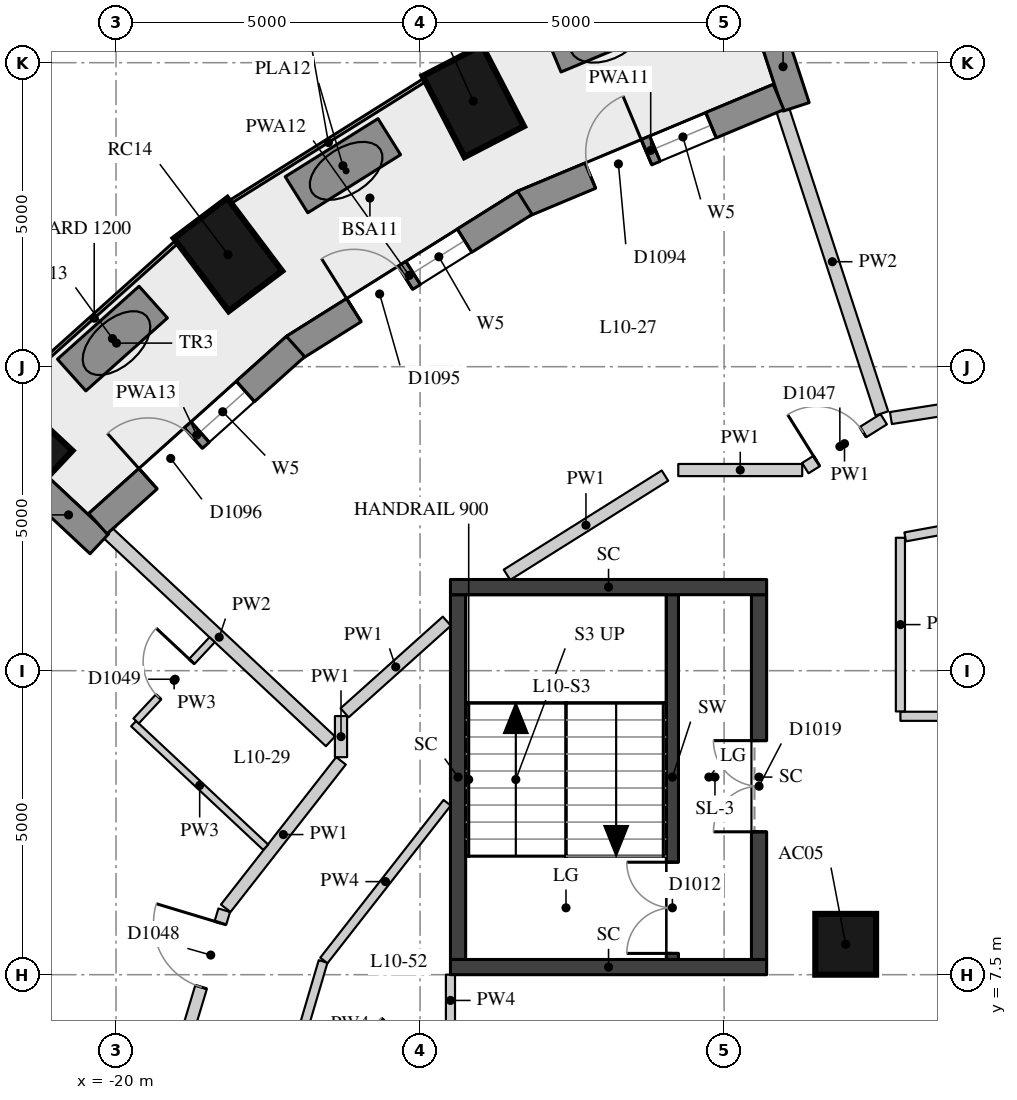
"""IFC4 building model, lengths in metres.
Left out: names, types, materials, properties, quantities, classifications, styles, units other than length and angle.
Written with IfcOpenShell. Run it as: python <this file> out.ifc"""

import sys

from ifc_helpers import new_model, si_unit, direction, frame, frame_2d, origin, origin_2d, place, context, subcontext, project, spatial, rectangle, extrude, element, fill, save


model = new_model("IFC4")
c1 = context("Model", 3, precision=1e-05, world=origin(), true_north=direction((0.0, 1.0)))
c2 = subcontext(c1, "Body", "Model", "MODEL_VIEW")
j1 = project(units=[si_unit("LENGTHUNIT", "METRE"), si_unit("PLANEANGLEUNIT", "RADIAN")], contexts=[c1])
p1 = place(None, origin())
s1 = spatial("IfcSite", under=j1, at=p1, CompositionType="ELEMENT")
p2 = place(p1, origin())
s2 = spatial("IfcBuilding", under=s1, at=p2, CompositionType="ELEMENT")
p3 = place(p2, frame((0.0, 0.0, 41.5)))
s3 = spatial("IfcBuildingStorey", under=s2, at=p3, CompositionType="ELEMENT", Elevation=41.5)
for number, where, z_axis, x_axis in (
    (1, (-14.125, 21.867, 0.0), (0.0, 0.0, 1.0), (-0.46, 0.888, 0.0)),
    (2, (-18.159, 19.343, 0.0), (0.0, 0.0, 1.0), (-0.601, 0.799, 0.0)),
    (3, (-21.641, 16.23, 0.0), (0.0, 0.0, 1.0), (-0.73, 0.683, 0.0)),
):
    element("IfcColumn", number, at=place(p3, frame(where, z_axis=z_axis, x_axis=x_axis)), inside=s3, PredefinedType="COLUMN", context=c2, shape_type="SweptSolid", body=[
        extrude(rectangle(XDim=1.5, YDim=1.1, at=origin_2d()), origin(), (0.0, 0.0, 1.0), 3.3),
    ])
p4 = place(p3, frame((-8.0, 8.0, 0.0), z_axis=(0.0, 0.0, 1.0), x_axis=(1.0, 0.0, 0.0)))
e4 = element("IfcColumn", 4, at=p4, inside=s3, PredefinedType="COLUMN", context=c2, shape_type="SweptSolid", body=[
    extrude(rectangle(XDim=1.0, YDim=1.0, at=origin_2d()), origin(), (0.0, 0.0, 1.0), 3.3),
])
p5 = place(p3, frame((-9.246, 23.095, 0.0), z_axis=(0.0, 0.0, 1.0), x_axis=(0.310110311429, -0.950700581017, 0.0)))
e5 = element("IfcWall", 5, at=p5, inside=s3, PredefinedType="SOLIDWALL", context=c2, shape_type="SweptSolid", body=[
    extrude(rectangle(XDim=1.39, YDim=0.45, at=frame_2d((0.695, 0.0))), origin(), (0.0, 0.0, 1.0), 3.02),
])
p6 = place(p3, frame((-21.289, 15.538, 0.0), z_axis=(0.0, 0.0, 1.0), x_axis=(0.730149942784, -0.683286953668, 0.0)))
e6 = element("IfcWall", 6, at=p6, inside=s3, PredefinedType="SOLIDWALL", context=c2, shape_type="SweptSolid", body=[
    extrude(rectangle(XDim=1.391, YDim=0.45, at=frame_2d((0.695, 0.0))), origin(), (0.0, 0.0, 1.0), 3.02),
])
p7 = place(p3, frame((-9.104, 21.936, 0.0), z_axis=(0.0, 0.0, 1.0), x_axis=(-0.922645368502, -0.385649483317, 0.0)))
e7 = element("IfcWall", 7, at=p7, inside=s3, PredefinedType="SOLIDWALL", context=c2, shape_type="SweptSolid", body=[
    extrude(rectangle(XDim=4.559, YDim=0.45, at=frame_2d((2.279, 0.0))), origin(), (0.0, 0.0, 1.0), 3.02),
])
p8 = place(p7, frame((1.204, 0.0, 0.4)))
e8 = element("IfcOpeningElement", 8, at=p8, cuts=e7, PredefinedType="OPENING", context=c2, shape_type="SweptSolid", body=[
    extrude(rectangle(XDim=1.0, YDim=1.75, at=frame_2d((0.5, 0.875))), frame((0.0, 0.235, 0.0), z_axis=(0.0, -1.0, 0.0), x_axis=(1.0, 0.0, 0.0)), (0.0, 0.0, 1.0), 0.47),
])
p9 = place(p7, frame((2.354, 0.0, 0.0)))
e9 = element("IfcOpeningElement", 9, at=p9, cuts=e7, PredefinedType="OPENING", context=c2, shape_type="SweptSolid", body=[
    extrude(rectangle(XDim=1.0, YDim=2.15, at=frame_2d((0.5, 1.075))), frame((0.0, 0.235, 0.0), z_axis=(0.0, -1.0, 0.0), x_axis=(1.0, 0.0, 0.0)), (0.0, 0.0, 1.0), 0.47),
])
p10 = place(p3, frame((-13.277, 20.195, 0.0), z_axis=(0.0, 0.0, 1.0), x_axis=(-0.846976005863, -0.531631117874, 0.0)))
e10 = element("IfcWall", 10, at=p10, inside=s3, PredefinedType="SOLIDWALL", context=c2, shape_type="SweptSolid", body=[
    extrude(rectangle(XDim=4.488, YDim=0.45, at=frame_2d((2.244, 0.0))), origin(), (0.0, 0.0, 1.0), 3.02),
])
p11 = place(p10, frame((1.169, 0.0, 0.4)))
e11 = element("IfcOpeningElement", 11, at=p11, cuts=e10, PredefinedType="OPENING", context=c2, shape_type="SweptSolid", body=[
    extrude(rectangle(XDim=1.0, YDim=1.75, at=frame_2d((0.5, 0.875))), frame((0.0, 0.235, 0.0), z_axis=(0.0, -1.0, 0.0), x_axis=(1.0, 0.0, 0.0)), (0.0, 0.0, 1.0), 0.47),
])
p12 = place(p10, frame((2.319, 0.0, 0.0)))
e12 = element("IfcOpeningElement", 12, at=p12, cuts=e10, PredefinedType="OPENING", context=c2, shape_type="SweptSolid", body=[
    extrude(rectangle(XDim=1.0, YDim=2.15, at=frame_2d((0.5, 1.075))), frame((0.0, 0.235, 0.0), z_axis=(0.0, -1.0, 0.0), x_axis=(1.0, 0.0, 0.0)), (0.0, 0.0, 1.0), 0.47),
])
p13 = place(p3, frame((-17.048, 17.832, 0.0), z_axis=(0.0, 0.0, 1.0), x_axis=(-0.744619286768, -0.667489413978, 0.0)))
e13 = element("IfcWall", 13, at=p13, inside=s3, PredefinedType="SOLIDWALL", context=c2, shape_type="SweptSolid", body=[
    extrude(rectangle(XDim=4.365, YDim=0.45, at=frame_2d((2.183, 0.0))), origin(), (0.0, 0.0, 1.0), 3.02),
])
p14 = place(p13, frame((1.107, 0.0, 0.4)))
e14 = element("IfcOpeningElement", 14, at=p14, cuts=e13, PredefinedType="OPENING", context=c2, shape_type="SweptSolid", body=[
    extrude(rectangle(XDim=1.0, YDim=1.75, at=frame_2d((0.5, 0.875))), frame((0.0, 0.235, 0.0), z_axis=(0.0, -1.0, 0.0), x_axis=(1.0, 0.0, 0.0)), (0.0, 0.0, 1.0), 0.47),
])
p15 = place(p13, frame((2.258, 0.0, 0.0)))
e15 = element("IfcOpeningElement", 15, at=p15, cuts=e13, PredefinedType="OPENING", context=c2, shape_type="SweptSolid", body=[
    extrude(rectangle(XDim=1.0, YDim=2.15, at=frame_2d((0.5, 1.075))), frame((0.0, 0.235, 0.0), z_axis=(0.0, -1.0, 0.0), x_axis=(1.0, 0.0, 0.0)), (0.0, 0.0, 1.0), 0.47),
])
p16 = place(p3, frame((-11.155, 23.362, 0.0), z_axis=(0.0, 0.0, 1.0), x_axis=(-0.923000660042, -0.384798364811, 0.0)))
e16 = element("IfcWall", 16, at=p16, inside=s3, PredefinedType="USERDEFINED", context=c2, shape_type="SweptSolid", body=[
    extrude(rectangle(XDim=1.8, YDim=0.7, at=frame_2d((0.9, 0.0))), origin(), (0.0, 0.0, 1.0), 0.75),
])
p17 = place(p3, frame((-15.506, 21.283, 0.0), z_axis=(0.0, 0.0, 1.0), x_axis=(-0.847609446823, -0.530620604252, 0.0)))
e17 = element("IfcWall", 17, at=p17, inside=s3, PredefinedType="USERDEFINED", context=c2, shape_type="SweptSolid", body=[
    extrude(rectangle(XDim=1.8, YDim=0.7, at=frame_2d((0.9, 0.0))), origin(), (0.0, 0.0, 1.0), 0.75),
])
p18 = place(p3, frame((-19.388, 18.562, 0.0), z_axis=(0.0, 0.0, 1.0), x_axis=(-0.745535653445, -0.666465745139, 0.0)))
e18 = element("IfcWall", 18, at=p18, inside=s3, PredefinedType="USERDEFINED", context=c2, shape_type="SweptSolid", body=[
    extrude(rectangle(XDim=1.8, YDim=0.7, at=frame_2d((0.9, 0.0))), origin(), (0.0, 0.0, 1.0), 0.75),
])
p19 = place(p3, frame((-10.85, 7.75, 0.0), z_axis=(0.0, 0.0, 1.0), x_axis=(0.0, 1.0, 0.0)))
e19 = element("IfcWall", 19, at=p19, inside=s3, PredefinedType="SHEAR", context=c2, shape_type="SweptSolid", body=[
    extrude(rectangle(XDim=6.0, YDim=0.2, at=frame_2d((3.0, 0.0))), origin(), (0.0, 0.0, 1.0), 3.02),
])
p20 = place(p19, frame((0.1, 0.0, 0.0)))
e20 = element("IfcOpeningElement", 20, at=p20, cuts=e19, PredefinedType="OPENING", context=c2, shape_type="SweptSolid", body=[
    extrude(rectangle(XDim=1.5, YDim=2.1, at=frame_2d((0.75, 1.05))), frame((0.0, 0.11, 0.0), z_axis=(0.0, -1.0, 0.0), x_axis=(1.0, 0.0, 0.0)), (0.0, 0.0, 1.0), 0.22),
])
p21 = place(p3, frame((-14.375, 7.75, -0.28), z_axis=(0.0, 0.0, 1.0), x_axis=(0.0, 1.0, 0.0)))
e21 = element("IfcWall", 21, at=p21, inside=s3, PredefinedType="SHEAR", context=c2, shape_type="SweptSolid", body=[
    extrude(rectangle(XDim=6.0, YDim=0.25, at=frame_2d((3.0, 0.0))), origin(), (0.0, 0.0, 1.0), 3.3),
])
p22 = place(p3, frame((-9.425, 7.75, -0.28), z_axis=(0.0, 0.0, 1.0), x_axis=(0.0, 1.0, 0.0)))
e22 = element("IfcWall", 22, at=p22, inside=s3, PredefinedType="SHEAR", context=c2, shape_type="SweptSolid", body=[
    extrude(rectangle(XDim=6.0, YDim=0.25, at=frame_2d((3.0, 0.0))), origin(), (0.0, 0.0, 1.0), 3.3),
])
p23 = place(p22, frame((2.1, 0.0, 0.28)))
e23 = element("IfcOpeningElement", 23, at=p23, cuts=e22, PredefinedType="OPENING", context=c2, shape_type="SweptSolid", body=[
    extrude(rectangle(XDim=1.5, YDim=2.1, at=frame_2d((0.75, 1.05))), frame((0.0, 0.135, 0.0), z_axis=(0.0, -1.0, 0.0), x_axis=(1.0, 0.0, 0.0)), (0.0, 0.0, 1.0), 0.27),
])
for number, where, z_axis, x_axis in (
    (24, (-14.5, 13.875, -0.28), (0.0, 0.0, 1.0), (1.0, 0.0, 0.0)),
    (25, (-14.5, 7.625, -0.28), (0.0, 0.0, 1.0), (1.0, 0.0, 0.0)),
):
    element("IfcWall", number, at=place(p3, frame(where, z_axis=z_axis, x_axis=x_axis)), inside=s3, PredefinedType="SHEAR", context=c2, shape_type="SweptSolid", body=[
        extrude(rectangle(XDim=5.2, YDim=0.25, at=frame_2d((2.6, 0.0))), origin(), (0.0, 0.0, 1.0), 3.3),
    ])
p24 = place(p3, frame((-20.771, 0.095, 0.0), z_axis=(0.0, 0.0, 1.0), x_axis=(0.288464952331, 0.957490454927, 0.0)))
e26 = element("IfcWall", 26, at=p24, inside=s3, PredefinedType="PARTITIONING", context=c2, shape_type="SweptSolid", body=[
    extrude(rectangle(XDim=8.841, YDim=0.2, at=frame_2d((4.42, 0.0))), origin(), (0.0, 0.0, 1.0), 3.02),
])
p25 = place(p24, frame((7.521, 0.0, 0.0)))
e27 = element("IfcOpeningElement", 27, at=p25, cuts=e26, PredefinedType="OPENING", context=c2, shape_type="SweptSolid", body=[
    extrude(rectangle(XDim=1.1, YDim=2.1, at=frame_2d((0.55, 1.05))), frame((0.0, 0.11, 0.0), z_axis=(0.0, -1.0, 0.0), x_axis=(1.0, 0.0, 0.0)), (0.0, 0.0, 1.0), 0.22),
])
p26 = place(p24, frame((0.877, 0.0, 0.0)))
e28 = element("IfcOpeningElement", 28, at=p26, cuts=e26, PredefinedType="OPENING", context=c2, shape_type="SweptSolid", body=[
    extrude(rectangle(XDim=0.9, YDim=2.1, at=frame_2d((0.45, 1.05))), frame((0.0, 0.11, 0.0), z_axis=(0.0, -1.0, 0.0), x_axis=(1.0, 0.0, 0.0)), (0.0, 0.0, 1.0), 0.22),
])
p27 = place(p3, frame((-18.196, 8.592, 0.0), z_axis=(0.0, 0.0, 1.0), x_axis=(0.615854849191, 0.787859635168, 0.0)))
e29 = element("IfcWall", 29, at=p27, inside=s3, PredefinedType="PARTITIONING", context=c2, shape_type="SweptSolid", body=[
    extrude(rectangle(XDim=3.079, YDim=0.2, at=frame_2d((1.539, 0.0))), origin(), (0.0, 0.0, 1.0), 3.02),
])
p28 = place(p3, frame((-16.3, 11.078, 0.0), z_axis=(0.0, 0.0, 1.0), x_axis=(0.0, 1.0, 0.0)))
e30 = element("IfcWall", 30, at=p28, inside=s3, PredefinedType="PARTITIONING", context=c2, shape_type="SweptSolid", body=[
    extrude(rectangle(XDim=0.676, YDim=0.2, at=frame_2d((0.338, 0.0))), origin(), (0.0, 0.0, 1.0), 3.02),
])
p29 = place(p3, frame((-16.24, 11.807, 0.0), z_axis=(0.0, 0.0, 1.0), x_axis=(0.744658399013, 0.667445779655, 0.0)))
e31 = element("IfcWall", 31, at=p29, inside=s3, PredefinedType="PARTITIONING", context=c2, shape_type="SweptSolid", body=[
    extrude(rectangle(XDim=2.258, YDim=0.2, at=frame_2d((1.129, 0.0))), origin(), (0.0, 0.0, 1.0), 3.02),
])
p30 = place(p3, frame((-13.571, 14.077, 0.0), z_axis=(0.0, 0.0, 1.0), x_axis=(0.846954991261, 0.53166459613, 0.0)))
e32 = element("IfcWall", 32, at=p30, inside=s3, PredefinedType="PARTITIONING", context=c2, shape_type="SweptSolid", body=[
    extrude(rectangle(XDim=3.068, YDim=0.2, at=frame_2d((1.534, 0.0))), origin(), (0.0, 0.0, 1.0), 3.02),
])
p31 = place(p3, frame((-10.753, 15.8, 0.0), z_axis=(0.0, 0.0, 1.0), x_axis=(1.0, 0.0, 0.0)))
e33 = element("IfcWall", 33, at=p31, inside=s3, PredefinedType="PARTITIONING", context=c2, shape_type="SweptSolid", body=[
    extrude(rectangle(XDim=2.039, YDim=0.2, at=frame_2d((1.019, 0.0))), origin(), (0.0, 0.0, 1.0), 3.02),
])
p32 = place(p3, frame((-8.664, 15.832, 0.0), z_axis=(0.0, 0.0, 1.0), x_axis=(0.848304931689, 0.529508019648, 0.0)))
e34 = element("IfcWall", 34, at=p32, inside=s3, PredefinedType="PARTITIONING", context=c2, shape_type="SweptSolid", body=[
    extrude(rectangle(XDim=1.52, YDim=0.2, at=frame_2d((0.76, 0.0))), origin(), (0.0, 0.0, 1.0), 3.02),
])
p33 = place(p32, frame((0.22, 0.0, 0.0)))
e35 = element("IfcOpeningElement", 35, at=p33, cuts=e34, PredefinedType="OPENING", context=c2, shape_type="SweptSolid", body=[
    extrude(rectangle(XDim=0.9, YDim=2.1, at=frame_2d((0.45, 1.05))), frame((0.0, 0.11, 0.0), z_axis=(0.0, -1.0, 0.0), x_axis=(1.0, 0.0, 0.0)), (0.0, 0.0, 1.0), 0.22),
])
p34 = place(p3, frame((-7.256, 16.656, 0.0), z_axis=(0.0, 0.0, 1.0), x_axis=(0.987787475409, 0.15580726371, 0.0)))
e36 = element("IfcWall", 36, at=p34, inside=s3, PredefinedType="PARTITIONING", context=c2, shape_type="SweptSolid", body=[
    extrude(rectangle(XDim=7.346, YDim=0.2, at=frame_2d((3.673, 0.0))), origin(), (0.0, 0.0, 1.0), 3.02),
])
p35 = place(p34, frame((3.86, 0.0, 0.0)))
e37 = element("IfcOpeningElement", 37, at=p35, cuts=e36, PredefinedType="OPENING", context=c2, shape_type="SweptSolid", body=[
    extrude(rectangle(XDim=1.1, YDim=2.1, at=frame_2d((0.55, 1.05))), frame((0.0, 0.11, 0.0), z_axis=(0.0, -1.0, 0.0), x_axis=(1.0, 0.0, 0.0)), (0.0, 0.0, 1.0), 0.22),
])
p36 = place(p3, frame((-4.58, 11.75, 0.0), z_axis=(0.0, 0.0, 1.0), x_axis=(-1.0, 0.0, 0.0)))
e38 = element("IfcWall", 38, at=p36, inside=s3, PredefinedType="PARTITIONING", context=c2, shape_type="SweptSolid", body=[
    extrude(rectangle(XDim=2.52, YDim=0.15, at=frame_2d((1.26, 0.0))), origin(), (0.0, 0.0, 1.0), 3.02),
])
p37 = place(p3, frame((-7.1, 11.83, 0.0), z_axis=(0.0, 0.0, 1.0), x_axis=(0.0, 1.0, 0.0)))
e39 = element("IfcWall", 39, at=p37, inside=s3, PredefinedType="PARTITIONING", context=c2, shape_type="SweptSolid", body=[
    extrude(rectangle(XDim=2.856, YDim=0.15, at=frame_2d((1.428, 0.0))), origin(), (0.0, 0.0, 1.0), 3.02),
])
p38 = place(p3, frame((-7.021, 14.701, 0.0), z_axis=(0.0, 0.0, 1.0), x_axis=(0.983567630435, 0.180540068573, 0.0)))
e40 = element("IfcWall", 40, at=p38, inside=s3, PredefinedType="PARTITIONING", context=c2, shape_type="SweptSolid", body=[
    extrude(rectangle(XDim=6.66, YDim=0.15, at=frame_2d((3.33, 0.0))), origin(), (0.0, 0.0, 1.0), 2.57),
])
p39 = place(p3, frame((-14.5, 7.501, 0.0), z_axis=(0.0, 0.0, 1.0), x_axis=(0.0, -1.0, 0.0)))
e41 = element("IfcWall", 41, at=p39, inside=s3, PredefinedType="PARTITIONING", context=c2, shape_type="SweptSolid", body=[
    extrude(rectangle(XDim=0.849, YDim=0.15, at=frame_2d((0.424, 0.0))), origin(), (0.0, 0.0, 1.0), 3.02),
])
p40 = place(p3, frame((-17.206, 5.645, 0.0), z_axis=(0.0, 0.0, 1.0), x_axis=(0.282930600638, 0.95914038348, 0.0)))
e42 = element("IfcWall", 42, at=p40, inside=s3, PredefinedType="PARTITIONING", context=c2, shape_type="SweptSolid", body=[
    extrude(rectangle(XDim=2.162, YDim=0.15, at=frame_2d((1.081, 0.0))), origin(), (0.0, 0.0, 1.0), 3.02),
])
p41 = place(p3, frame((-16.582, 7.734, 0.0), z_axis=(0.0, 0.0, 1.0), x_axis=(0.615848335932, 0.787864726416, 0.0)))
e43 = element("IfcWall", 43, at=p41, inside=s3, PredefinedType="PARTITIONING", context=c2, shape_type="SweptSolid", body=[
    extrude(rectangle(XDim=3.293, YDim=0.15, at=frame_2d((1.646, 0.0))), origin(), (0.0, 0.0, 1.0), 3.02),
])
p42 = place(p3, frame((-9.034, 21.721, 0.0), z_axis=(0.0, 0.0, 1.0), x_axis=(0.310304845104, -0.950637103791, 0.0)))
e44 = element("IfcWall", 44, at=p42, inside=s3, PredefinedType="PARTITIONING", context=c2, shape_type="SweptSolid", body=[
    extrude(rectangle(XDim=5.249, YDim=0.22, at=frame_2d((2.624, 0.0))), origin(), (0.0, 0.0, 1.0), 3.02),
])
p43 = place(p3, frame((-20.133, 14.764, 0.0), z_axis=(0.0, 0.0, 1.0), x_axis=(0.73007309337, -0.683369064516, 0.0)))
e45 = element("IfcWall", 45, at=p43, inside=s3, PredefinedType="PARTITIONING", context=c2, shape_type="SweptSolid", body=[
    extrude(rectangle(XDim=5.013, YDim=0.22, at=frame_2d((2.507, 0.0))), origin(), (0.0, 0.0, 1.0), 3.02),
])
p44 = place(p3, frame((-17.538, 9.596, 0.0), z_axis=(0.0, 0.0, 1.0), x_axis=(-0.730099766179, 0.683340567671, 0.0)))
e46 = element("IfcWall", 46, at=p44, inside=s3, PredefinedType="PARTITIONING", context=c2, shape_type="SweptSolid", body=[
    extrude(rectangle(XDim=2.976, YDim=0.12, at=frame_2d((1.488, 0.0))), origin(), (0.0, 0.0, 1.0), 3.02),
])
p45 = place(p3, frame((-19.67, 11.673, 0.0), z_axis=(0.0, 0.0, 1.0), x_axis=(0.683372850006, 0.730069550026, 0.0)))
e47 = element("IfcWall", 47, at=p45, inside=s3, PredefinedType="PARTITIONING", context=c2, shape_type="SweptSolid", body=[
    extrude(rectangle(XDim=1.83, YDim=0.12, at=frame_2d((0.915, 0.0))), origin(), (0.0, 0.0, 1.0), 3.02),
])
p46 = place(p45, frame((0.54, 0.0, 0.0)))
e48 = element("IfcOpeningElement", 48, at=p46, cuts=e47, PredefinedType="OPENING", context=c2, shape_type="SweptSolid", body=[
    extrude(rectangle(XDim=0.8, YDim=2.1, at=frame_2d((0.4, 1.05))), frame((0.0, 0.07, 0.0), z_axis=(0.0, -1.0, 0.0), x_axis=(1.0, 0.0, 0.0)), (0.0, 0.0, 1.0), 0.14),
])
p47 = place(p8, origin())
e49 = element("IfcWindow", 49, at=p47, inside=s3, PartitioningType="SINGLE_PANEL", PredefinedType="WINDOW", context=c2, shape_type="SweptSolid", body=[
    extrude(rectangle(XDim=1.0, YDim=1.75, at=frame_2d((0.5, 0.875))), frame((0.0, 0.035, 0.0), z_axis=(0.0, -1.0, 0.0), x_axis=(1.0, 0.0, 0.0)), (0.0, 0.0, 1.0), 0.06),
])
fill(e8, e49)
p48 = place(p9, frame((1.0, 0.0, 0.0), z_axis=(0.0, 0.0, 1.0), x_axis=(-1.0, 0.0, 0.0)))
e50 = element("IfcDoor", 50, at=p48, inside=s3, OperationType="SINGLE_SWING_RIGHT", PredefinedType="DOOR", context=c2, shape_type="SweptSolid", body=[
    extrude(rectangle(XDim=1.0, YDim=2.15, at=frame_2d((0.5, 1.075))), frame((0.0, 0.075, 0.0), z_axis=(0.0, -1.0, 0.0), x_axis=(1.0, 0.0, 0.0)), (0.0, 0.0, 1.0), 0.05),
])
fill(e9, e50)
p49 = place(p11, origin())
e51 = element("IfcWindow", 51, at=p49, inside=s3, PartitioningType="SINGLE_PANEL", PredefinedType="WINDOW", context=c2, shape_type="SweptSolid", body=[
    extrude(rectangle(XDim=1.0, YDim=1.75, at=frame_2d((0.5, 0.875))), frame((0.0, 0.035, 0.0), z_axis=(0.0, -1.0, 0.0), x_axis=(1.0, 0.0, 0.0)), (0.0, 0.0, 1.0), 0.06),
])
fill(e11, e51)
p50 = place(p12, frame((1.0, 0.0, 0.0), z_axis=(0.0, 0.0, 1.0), x_axis=(-1.0, 0.0, 0.0)))
e52 = element("IfcDoor", 52, at=p50, inside=s3, OperationType="SINGLE_SWING_LEFT", PredefinedType="DOOR", context=c2, shape_type="SweptSolid", body=[
    extrude(rectangle(XDim=1.0, YDim=2.15, at=frame_2d((0.5, 1.075))), frame((0.0, 0.075, 0.0), z_axis=(0.0, -1.0, 0.0), x_axis=(1.0, 0.0, 0.0)), (0.0, 0.0, 1.0), 0.05),
])
fill(e12, e52)
p51 = place(p14, origin())
e53 = element("IfcWindow", 53, at=p51, inside=s3, PartitioningType="SINGLE_PANEL", PredefinedType="WINDOW", context=c2, shape_type="SweptSolid", body=[
    extrude(rectangle(XDim=1.0, YDim=1.75, at=frame_2d((0.5, 0.875))), frame((0.0, 0.035, 0.0), z_axis=(0.0, -1.0, 0.0), x_axis=(1.0, 0.0, 0.0)), (0.0, 0.0, 1.0), 0.06),
])
fill(e14, e53)
p52 = place(p15, frame((1.0, 0.0, 0.0), z_axis=(0.0, 0.0, 1.0), x_axis=(-1.0, 0.0, 0.0)))
e54 = element("IfcDoor", 54, at=p52, inside=s3, OperationType="SINGLE_SWING_LEFT", PredefinedType="DOOR", context=c2, shape_type="SweptSolid", body=[
    extrude(rectangle(XDim=1.0, YDim=2.15, at=frame_2d((0.5, 1.075))), frame((0.0, 0.075, 0.0), z_axis=(0.0, -1.0, 0.0), x_axis=(1.0, 0.0, 0.0)), (0.0, 0.0, 1.0), 0.05),
])
fill(e15, e54)
p53 = place(p20, origin())
e55 = element("IfcDoor", 55, at=p53, inside=s3, OperationType="DOUBLE_DOOR_SINGLE_SWING", PredefinedType="DOOR", context=c2, shape_type="SweptSolid", body=[
    extrude(rectangle(XDim=1.5, YDim=2.1, at=frame_2d((0.75, 1.05))), frame((0.0, 0.025, 0.0), z_axis=(0.0, -1.0, 0.0), x_axis=(1.0, 0.0, 0.0)), (0.0, 0.0, 1.0), 0.05),
])
fill(e20, e55)
p54 = place(p23, origin())
e56 = element("IfcDoor", 56, at=p54, inside=s3, OperationType="DOUBLE_DOOR_SINGLE_SWING", PredefinedType="DOOR", context=c2, shape_type="SweptSolid", body=[
    extrude(rectangle(XDim=1.5, YDim=2.1, at=frame_2d((0.75, 1.05))), frame((0.0, 0.025, 0.0), z_axis=(0.0, -1.0, 0.0), x_axis=(1.0, 0.0, 0.0)), (0.0, 0.0, 1.0), 0.05),
])
fill(e23, e56)
p55 = place(p33, origin())
e57 = element("IfcDoor", 57, at=p55, inside=s3, OperationType="SINGLE_SWING_LEFT", PredefinedType="DOOR", context=c2, shape_type="SweptSolid", body=[
    extrude(rectangle(XDim=0.9, YDim=2.1, at=frame_2d((0.45, 1.05))), frame((0.0, 0.025, 0.0), z_axis=(0.0, -1.0, 0.0), x_axis=(1.0, 0.0, 0.0)), (0.0, 0.0, 1.0), 0.05),
])
fill(e35, e57)
p56 = place(p25, origin())
e58 = element("IfcDoor", 58, at=p56, inside=s3, OperationType="SINGLE_SWING_RIGHT", PredefinedType="DOOR", context=c2, shape_type="SweptSolid", body=[
    extrude(rectangle(XDim=1.1, YDim=2.1, at=frame_2d((0.55, 1.05))), frame((0.0, 0.025, 0.0), z_axis=(0.0, -1.0, 0.0), x_axis=(1.0, 0.0, 0.0)), (0.0, 0.0, 1.0), 0.05),
])
fill(e27, e58)
p57 = place(p46, origin())
e59 = element("IfcDoor", 59, at=p57, inside=s3, OperationType="SINGLE_SWING_RIGHT", PredefinedType="DOOR", context=c2, shape_type="SweptSolid", body=[
    extrude(rectangle(XDim=0.8, YDim=2.1, at=frame_2d((0.4, 1.05))), frame((0.0, 0.025, 0.0), z_axis=(0.0, -1.0, 0.0), x_axis=(1.0, 0.0, 0.0)), (0.0, 0.0, 1.0), 0.05),
])
fill(e48, e59)
save(model, sys.argv[1])
